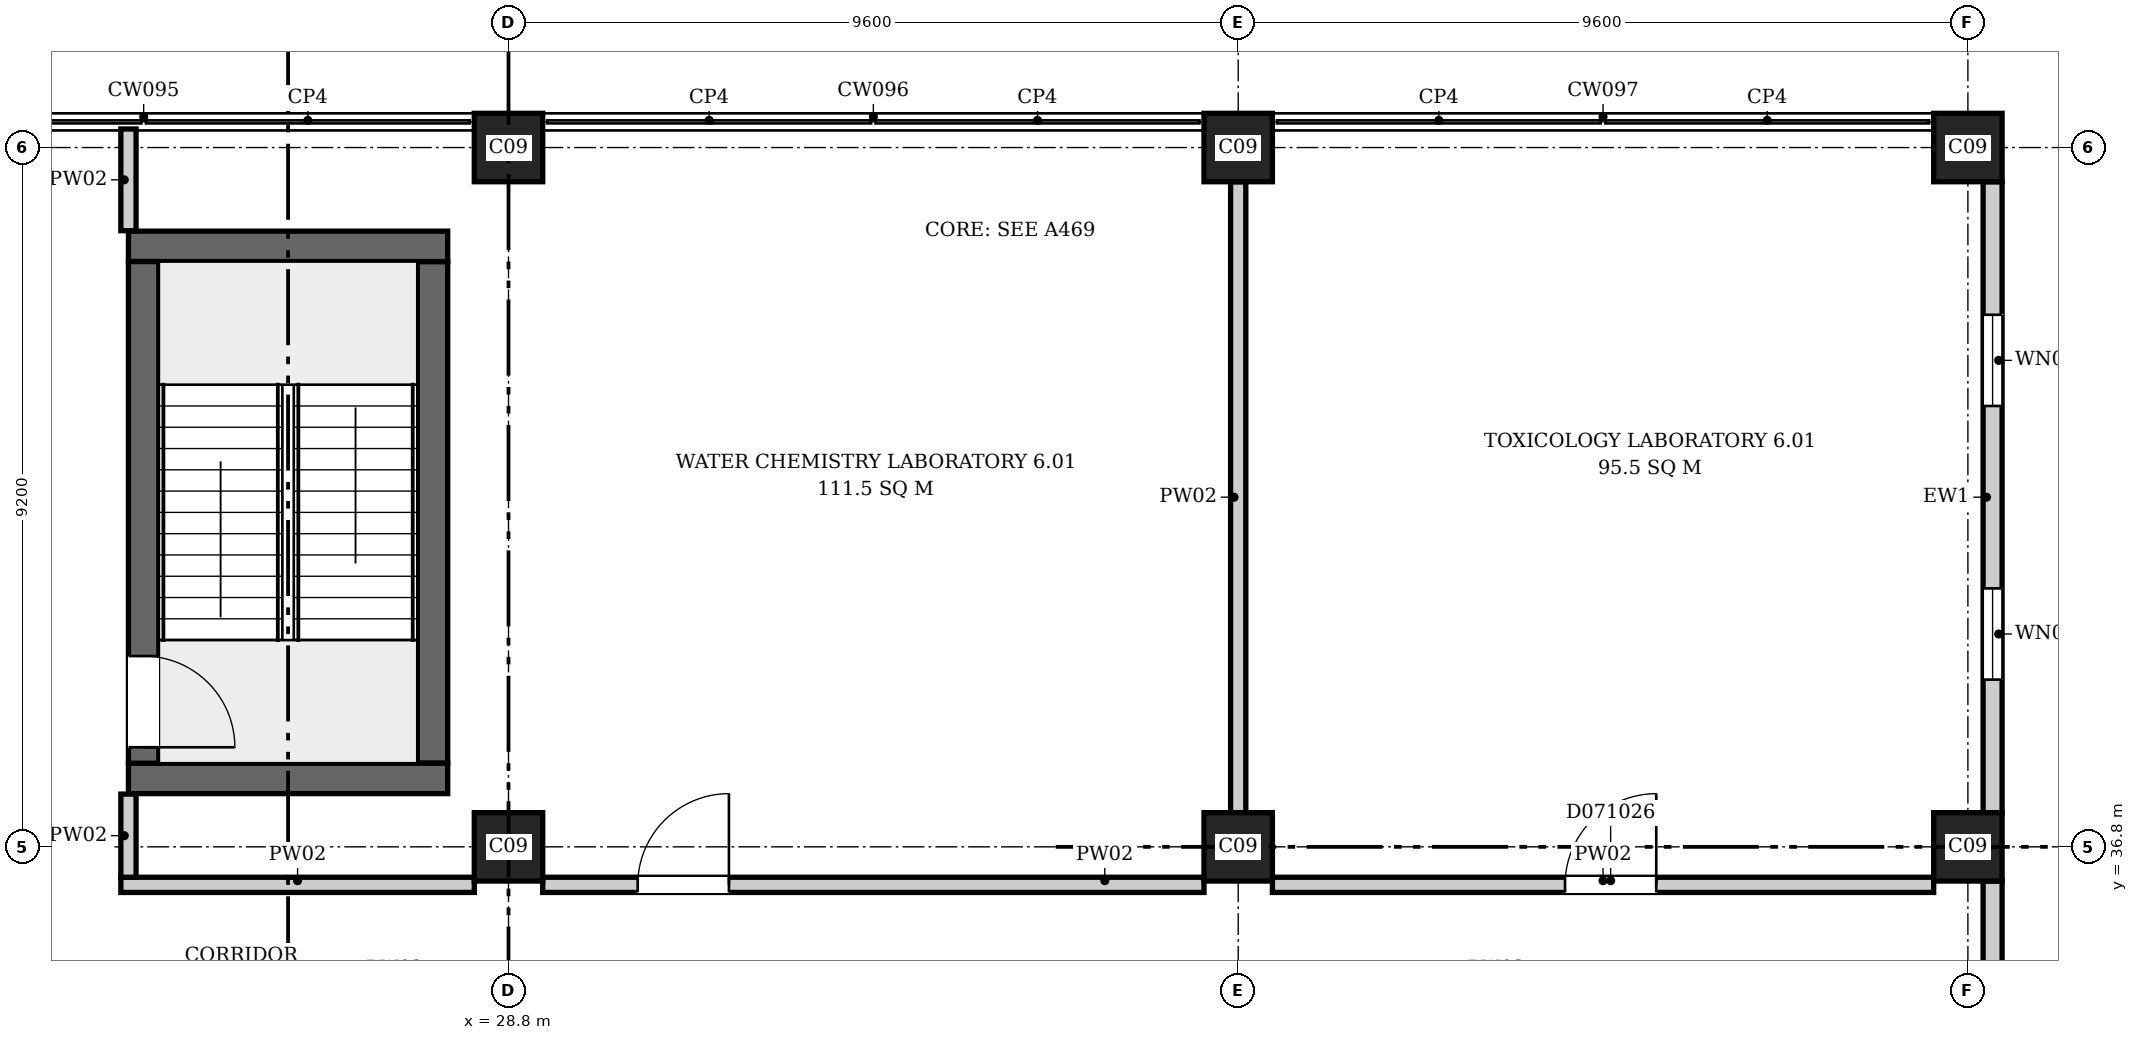
"""IFC4 building model, lengths in metres.
Left out: names, types, materials, properties, quantities, classifications, styles, units other than length and angle.
Written with IfcOpenShell. Run it as: python <this file> out.ifc"""

import sys

from ifc_helpers import new_model, si_unit, direction, frame, frame_2d, origin, origin_2d, place, context, subcontext, project, spatial, rectangle, extrude, element, fill, save


model = new_model("IFC4")
c1 = context("Model", 3, precision=1e-05, world=origin(), true_north=direction((0.0, 1.0)))
c2 = subcontext(c1, "Body", "Model", "MODEL_VIEW")
j1 = project(units=[si_unit("LENGTHUNIT", "METRE"), si_unit("PLANEANGLEUNIT", "RADIAN")], contexts=[c1])
p1 = place(None, origin())
s1 = spatial("IfcSite", under=j1, at=p1, CompositionType="ELEMENT")
p2 = place(p1, origin())
s2 = spatial("IfcBuilding", under=s1, at=p2, CompositionType="ELEMENT")
p3 = place(p2, frame((0.0, 0.0, 36.1)))
s3 = spatial("IfcBuildingStorey", under=s2, at=p3, CompositionType="ELEMENT", Elevation=36.1)
for number, where, z_axis, x_axis in (
    (1, (23.8, 37.7, 0.0), (0.0, 0.0, 1.0), (1.0, 0.0, 0.0)),
    (2, (23.8, 44.7, 0.0), (0.0, 0.0, 1.0), (1.0, 0.0, 0.0)),
):
    element("IfcWall", number, at=place(p3, frame(where, z_axis=z_axis, x_axis=x_axis)), inside=s3, PredefinedType="SHEAR", context=c2, shape_type="SweptSolid", body=[
        extrude(rectangle(XDim=4.2, YDim=0.4, at=frame_2d((2.1, 0.0))), origin(), (0.0, 0.0, 1.0), 4.2),
    ])
p4 = place(p3, frame((24.0, 37.9, 0.0), z_axis=(0.0, 0.0, 1.0), x_axis=(0.0, 1.0, 0.0)))
e3 = element("IfcWall", 3, at=p4, inside=s3, PredefinedType="SHEAR", context=c2, shape_type="SweptSolid", body=[
    extrude(rectangle(XDim=6.6, YDim=0.4, at=frame_2d((3.3, 0.0))), origin(), (0.0, 0.0, 1.0), 4.2),
])
p5 = place(p4, frame((0.21, 0.0, 0.0)))
e4 = element("IfcOpeningElement", 4, at=p5, cuts=e3, PredefinedType="OPENING", context=c2, shape_type="SweptSolid", body=[
    extrude(rectangle(XDim=1.2, YDim=2.1, at=frame_2d((0.6, 1.05))), frame((0.0, 0.21, 0.0), z_axis=(0.0, -1.0, 0.0), x_axis=(1.0, 0.0, 0.0)), (0.0, 0.0, 1.0), 0.42),
])
p6 = place(p3, frame((27.8, 37.9, 0.0), z_axis=(0.0, 0.0, 1.0), x_axis=(0.0, 1.0, 0.0)))
e5 = element("IfcWall", 5, at=p6, inside=s3, PredefinedType="SHEAR", context=c2, shape_type="SweptSolid", body=[
    extrude(rectangle(XDim=6.6, YDim=0.4, at=frame_2d((3.3, 0.0))), origin(), (0.0, 0.0, 1.0), 4.2),
])
for number, where, z_axis, x_axis in (
    (6, (28.8, 36.8, 0.0), (0.0, 0.0, 1.0), (1.0, 0.0, 0.0)),
    (7, (38.4, 36.8, 0.0), (0.0, 0.0, 1.0), (1.0, 0.0, 0.0)),
    (8, (48.0, 36.8, 0.0), (0.0, 0.0, 1.0), (1.0, 0.0, 0.0)),
    (9, (28.8, 46.0, 0.0), (0.0, 0.0, 1.0), (1.0, 0.0, 0.0)),
    (10, (38.4, 46.0, 0.0), (0.0, 0.0, 1.0), (1.0, 0.0, 0.0)),
    (11, (48.0, 46.0, 0.0), (0.0, 0.0, 1.0), (1.0, 0.0, 0.0)),
):
    element("IfcColumn", number, at=place(p3, frame(where, z_axis=z_axis, x_axis=x_axis)), inside=s3, PredefinedType="COLUMN", context=c2, shape_type="SweptSolid", body=[
        extrude(rectangle(XDim=0.9, YDim=0.9, at=origin_2d()), origin(), (0.0, 0.0, 1.0), 4.2),
    ])
p7 = place(p3, frame((48.325, 28.05, 0.0), z_axis=(0.0, 0.0, 1.0), x_axis=(0.0, 1.0, 0.0)))
e12 = element("IfcWall", 12, at=p7, inside=s3, PredefinedType="ELEMENTEDWALL", context=c2, shape_type="SweptSolid", body=[
    extrude(rectangle(XDim=8.3, YDim=0.25, at=frame_2d((4.15, 0.0))), origin(), (0.0, 0.0, 1.0), 3.9),
])
p8 = place(p7, frame((1.75, 0.0, 0.9)))
e13 = element("IfcOpeningElement", 13, at=p8, cuts=e12, PredefinedType="OPENING", context=c2, shape_type="SweptSolid", body=[
    extrude(rectangle(XDim=1.2, YDim=2.6, at=frame_2d((0.6, 1.3))), frame((0.0, 0.135, 0.0), z_axis=(0.0, -1.0, 0.0), x_axis=(1.0, 0.0, 0.0)), (0.0, 0.0, 1.0), 0.27),
])
p9 = place(p7, frame((5.35, 0.0, 0.9)))
e14 = element("IfcOpeningElement", 14, at=p9, cuts=e12, PredefinedType="OPENING", context=c2, shape_type="SweptSolid", body=[
    extrude(rectangle(XDim=1.2, YDim=2.6, at=frame_2d((0.6, 1.3))), frame((0.0, 0.135, 0.0), z_axis=(0.0, -1.0, 0.0), x_axis=(1.0, 0.0, 0.0)), (0.0, 0.0, 1.0), 0.27),
])
p10 = place(p3, frame((48.325, 37.25, 0.0), z_axis=(0.0, 0.0, 1.0), x_axis=(0.0, 1.0, 0.0)))
e15 = element("IfcWall", 15, at=p10, inside=s3, PredefinedType="ELEMENTEDWALL", context=c2, shape_type="SweptSolid", body=[
    extrude(rectangle(XDim=8.3, YDim=0.25, at=frame_2d((4.15, 0.0))), origin(), (0.0, 0.0, 1.0), 3.9),
])
p11 = place(p10, frame((1.75, 0.0, 0.9)))
e16 = element("IfcOpeningElement", 16, at=p11, cuts=e15, PredefinedType="OPENING", context=c2, shape_type="SweptSolid", body=[
    extrude(rectangle(XDim=1.2, YDim=2.6, at=frame_2d((0.6, 1.3))), frame((0.0, 0.135, 0.0), z_axis=(0.0, -1.0, 0.0), x_axis=(1.0, 0.0, 0.0)), (0.0, 0.0, 1.0), 0.27),
])
p12 = place(p10, frame((5.35, 0.0, 0.9)))
e17 = element("IfcOpeningElement", 17, at=p12, cuts=e15, PredefinedType="OPENING", context=c2, shape_type="SweptSolid", body=[
    extrude(rectangle(XDim=1.2, YDim=2.6, at=frame_2d((0.6, 1.3))), frame((0.0, 0.135, 0.0), z_axis=(0.0, -1.0, 0.0), x_axis=(1.0, 0.0, 0.0)), (0.0, 0.0, 1.0), 0.27),
])
p13 = place(p3, frame((23.7, 36.3, 0.0), z_axis=(0.0, 0.0, 1.0), x_axis=(1.0, 0.0, 0.0)))
e18 = element("IfcWall", 18, at=p13, inside=s3, PredefinedType="PARTITIONING", context=c2, shape_type="SweptSolid", body=[
    extrude(rectangle(XDim=4.65, YDim=0.2, at=frame_2d((2.325, 0.0))), origin(), (0.0, 0.0, 1.0), 3.9),
])
p14 = place(p3, frame((23.8, 36.4, 0.0), z_axis=(0.0, 0.0, 1.0), x_axis=(0.0, 1.0, 0.0)))
e19 = element("IfcWall", 19, at=p14, inside=s3, PredefinedType="PARTITIONING", context=c2, shape_type="SweptSolid", body=[
    extrude(rectangle(XDim=1.094, YDim=0.2, at=frame_2d((0.547, 0.0))), origin(), (0.0, 0.0, 1.0), 3.9),
])
p15 = place(p3, frame((23.8, 44.906, 0.0), z_axis=(0.0, 0.0, 1.0), x_axis=(0.0, 1.0, 0.0)))
e20 = element("IfcWall", 20, at=p15, inside=s3, PredefinedType="PARTITIONING", context=c2, shape_type="SweptSolid", body=[
    extrude(rectangle(XDim=1.338, YDim=0.2, at=frame_2d((0.669, 0.0))), origin(), (0.0, 0.0, 1.0), 3.9),
])
p16 = place(p3, frame((29.25, 36.3, 0.0), z_axis=(0.0, 0.0, 1.0), x_axis=(1.0, 0.0, 0.0)))
e21 = element("IfcWall", 21, at=p16, inside=s3, PredefinedType="PARTITIONING", context=c2, shape_type="SweptSolid", body=[
    extrude(rectangle(XDim=8.7, YDim=0.2, at=frame_2d((4.35, 0.0))), origin(), (0.0, 0.0, 1.0), 3.9),
])
p17 = place(p16, frame((1.25, 0.0, 0.0)))
e22 = element("IfcOpeningElement", 22, at=p17, cuts=e21, PredefinedType="OPENING", context=c2, shape_type="SweptSolid", body=[
    extrude(rectangle(XDim=1.2, YDim=2.1, at=frame_2d((0.6, 1.05))), frame((0.0, 0.11, 0.0), z_axis=(0.0, -1.0, 0.0), x_axis=(1.0, 0.0, 0.0)), (0.0, 0.0, 1.0), 0.22),
])
p18 = place(p3, frame((38.4, 37.25, 0.0), z_axis=(0.0, 0.0, 1.0), x_axis=(0.0, 1.0, 0.0)))
e23 = element("IfcWall", 23, at=p18, inside=s3, PredefinedType="PARTITIONING", context=c2, shape_type="SweptSolid", body=[
    extrude(rectangle(XDim=8.3, YDim=0.2, at=frame_2d((4.15, 0.0))), origin(), (0.0, 0.0, 1.0), 3.9),
])
p19 = place(p3, frame((38.85, 36.3, 0.0), z_axis=(0.0, 0.0, 1.0), x_axis=(1.0, 0.0, 0.0)))
e24 = element("IfcWall", 24, at=p19, inside=s3, PredefinedType="PARTITIONING", context=c2, shape_type="SweptSolid", body=[
    extrude(rectangle(XDim=8.7, YDim=0.2, at=frame_2d((4.35, 0.0))), origin(), (0.0, 0.0, 1.0), 3.9),
])
p20 = place(p19, frame((3.85, 0.0, 0.0)))
e25 = element("IfcOpeningElement", 25, at=p20, cuts=e24, PredefinedType="OPENING", context=c2, shape_type="SweptSolid", body=[
    extrude(rectangle(XDim=1.2, YDim=2.1, at=frame_2d((0.6, 1.05))), frame((0.0, 0.11, 0.0), z_axis=(0.0, -1.0, 0.0), x_axis=(1.0, 0.0, 0.0)), (0.0, 0.0, 1.0), 0.22),
])
p21 = place(p11, origin())
e26 = element("IfcWindow", 26, at=p21, inside=s3, PartitioningType="SINGLE_PANEL", PredefinedType="WINDOW", context=c2, shape_type="SweptSolid", body=[
    extrude(rectangle(XDim=1.2, YDim=2.6, at=frame_2d((0.6, 1.3))), frame((0.0, 0.03, 0.0), z_axis=(0.0, -1.0, 0.0), x_axis=(1.0, 0.0, 0.0)), (0.0, 0.0, 1.0), 0.06),
])
fill(e16, e26)
p22 = place(p12, origin())
e27 = element("IfcWindow", 27, at=p22, inside=s3, PartitioningType="SINGLE_PANEL", PredefinedType="WINDOW", context=c2, shape_type="SweptSolid", body=[
    extrude(rectangle(XDim=1.2, YDim=2.6, at=frame_2d((0.6, 1.3))), frame((0.0, 0.03, 0.0), z_axis=(0.0, -1.0, 0.0), x_axis=(1.0, 0.0, 0.0)), (0.0, 0.0, 1.0), 0.06),
])
fill(e17, e27)
p23 = place(p5, origin())
e28 = element("IfcDoor", 28, at=p23, inside=s3, OperationType="SINGLE_SWING_LEFT", PredefinedType="DOOR", context=c2, shape_type="SweptSolid", body=[
    extrude(rectangle(XDim=1.2, YDim=2.1, at=frame_2d((0.6, 1.05))), frame((0.0, 0.025, 0.0), z_axis=(0.0, -1.0, 0.0), x_axis=(1.0, 0.0, 0.0)), (0.0, 0.0, 1.0), 0.05),
])
fill(e4, e28)
p24 = place(p17, origin())
e29 = element("IfcDoor", 29, at=p24, inside=s3, OperationType="SINGLE_SWING_LEFT", PredefinedType="DOOR", context=c2, shape_type="SweptSolid", body=[
    extrude(rectangle(XDim=1.2, YDim=2.1, at=frame_2d((0.6, 1.05))), frame((0.0, 0.025, 0.0), z_axis=(0.0, -1.0, 0.0), x_axis=(1.0, 0.0, 0.0)), (0.0, 0.0, 1.0), 0.05),
])
fill(e22, e29)
p25 = place(p20, origin())
e30 = element("IfcDoor", 30, at=p25, inside=s3, OperationType="SINGLE_SWING_RIGHT", PredefinedType="DOOR", context=c2, shape_type="SweptSolid", body=[
    extrude(rectangle(XDim=1.2, YDim=2.1, at=frame_2d((0.6, 1.05))), frame((0.0, 0.025, 0.0), z_axis=(0.0, -1.0, 0.0), x_axis=(1.0, 0.0, 0.0)), (0.0, 0.0, 1.0), 0.05),
])
fill(e25, e30)
save(model, sys.argv[1])
